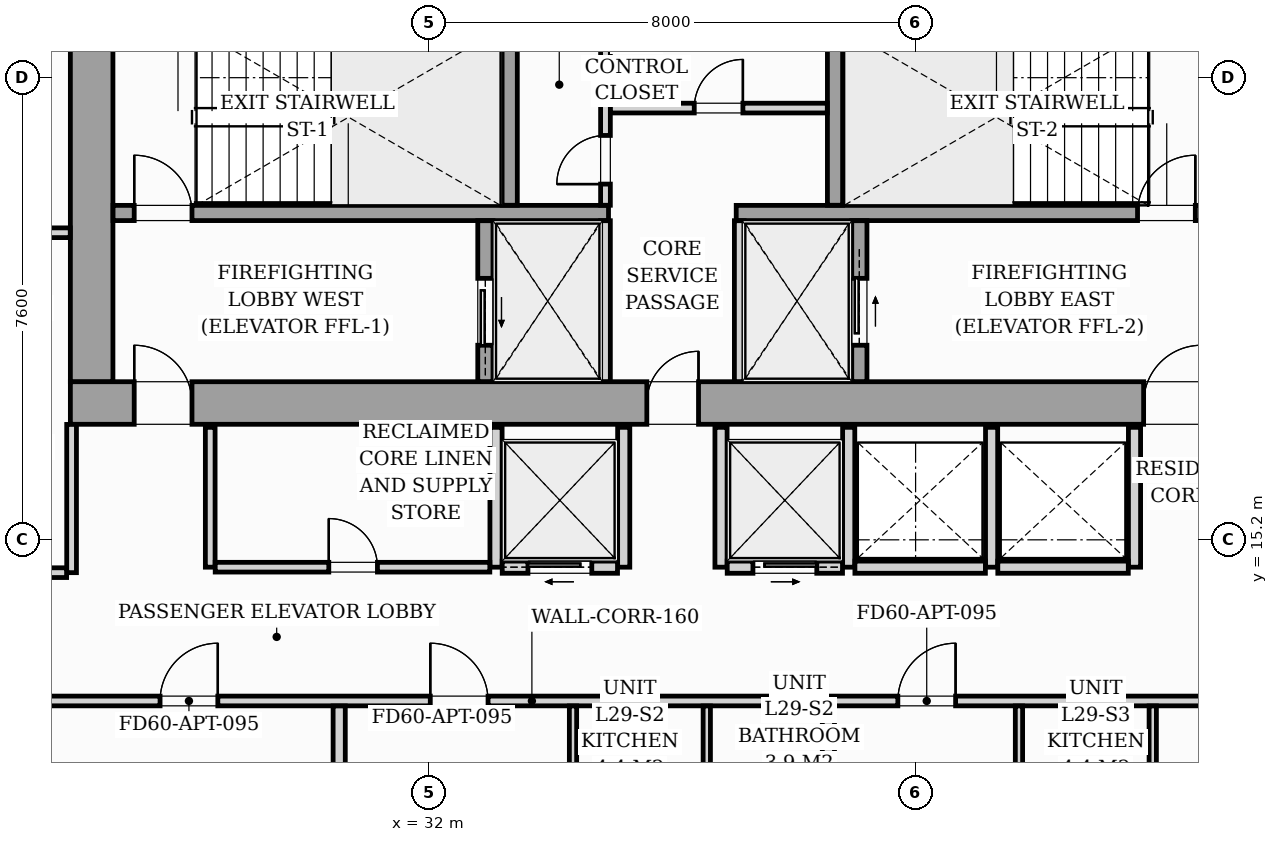
"""IFC4 building model, lengths in metres.
Left out: names, types, materials, properties, quantities, classifications, styles, units other than length and angle.
Written with IfcOpenShell. Run it as: python <this file> out.ifc"""

import sys

from ifc_helpers import new_model, si_unit, direction, frame, frame_2d, origin, origin_2d, place, context, subcontext, project, spatial, rectangle, i_section, extrude, source, transform, mapped, element, fill, save


model = new_model("IFC4")
c1 = context("Model", 3, precision=1e-05, world=origin(), true_north=direction((0.0, 1.0)))
c2 = subcontext(c1, "Body", "Model", "MODEL_VIEW")
j1 = project(units=[si_unit("LENGTHUNIT", "METRE"), si_unit("PLANEANGLEUNIT", "RADIAN")], contexts=[c1])
p1 = place(None, origin())
s1 = spatial("IfcSite", under=j1, at=p1, CompositionType="ELEMENT")
p2 = place(p1, origin())
s2 = spatial("IfcBuilding", under=s1, at=p2, CompositionType="ELEMENT")
p3 = place(p2, frame((0.0, 0.0, 103.4)))
s3 = spatial("IfcBuildingStorey", under=s2, at=p3, CompositionType="ELEMENT", Elevation=103.4)
m1 = source(origin(), c2, "Body", "SweptSolid", [
    extrude(i_section(OverallWidth=0.427, OverallDepth=0.483, WebThickness=0.051, FlangeThickness=0.082, FilletRadius=0.018, at=origin_2d()), origin(), (0.0, 0.0, 1.0), 3.196),
])
for number, where, z_axis, x_axis in (
    (1, (26.4, 17.4, 0.002), (0.0, 0.0, 1.0), (1.0, 0.0, 0.0)),
    (2, (33.12, 17.4, 0.002), (0.0, 0.0, 1.0), (1.0, 0.0, 0.0)),
    (3, (38.88, 17.4, 0.002), (0.0, 0.0, 1.0), (1.0, 0.0, 0.0)),
):
    element("IfcColumn", number, at=place(p3, frame(where, z_axis=z_axis, x_axis=x_axis)), inside=s3, PredefinedType="PILASTER", context=c2, shape_type="MappedRepresentation", body=[
        mapped(m1, transform((0.0, 0.0, 0.0), scale=1.0)),
    ])
p4 = place(p3, frame((26.1, 17.45, 0.0), z_axis=(0.0, 0.0, 1.0), x_axis=(1.0, 0.0, 0.0)))
e4 = element("IfcWall", 4, at=p4, inside=s3, PredefinedType="SHEAR", context=c2, shape_type="SweptSolid", body=[
    extrude(rectangle(XDim=19.8, YDim=0.7, at=frame_2d((9.9, 0.0))), origin(), (0.0, 0.0, 1.0), 3.2),
])
p5 = place(p4, frame((1.05, 0.0, 0.0)))
e5 = element("IfcOpeningElement", 5, at=p5, cuts=e4, PredefinedType="OPENING", context=c2, shape_type="SweptSolid", body=[
    extrude(rectangle(XDim=0.95, YDim=2.06, at=frame_2d((0.475, 1.03))), frame((0.0, 0.36, 0.0), z_axis=(0.0, -1.0, 0.0), x_axis=(1.0, 0.0, 0.0)), (0.0, 0.0, 1.0), 0.72),
])
p6 = place(p4, frame((9.48, 0.0, 0.0)))
e6 = element("IfcOpeningElement", 6, at=p6, cuts=e4, PredefinedType="OPENING", context=c2, shape_type="SweptSolid", body=[
    extrude(rectangle(XDim=0.85, YDim=2.0, at=frame_2d((0.425, 1.0))), frame((0.0, 0.36, 0.0), z_axis=(0.0, -1.0, 0.0), x_axis=(1.0, 0.0, 0.0)), (0.0, 0.0, 1.0), 0.72),
])
p7 = place(p4, frame((17.65, 0.0, 0.0)))
e7 = element("IfcOpeningElement", 7, at=p7, cuts=e4, PredefinedType="OPENING", context=c2, shape_type="SweptSolid", body=[
    extrude(rectangle(XDim=0.95, YDim=2.06, at=frame_2d((0.475, 1.03))), frame((0.0, 0.36, 0.0), z_axis=(0.0, -1.0, 0.0), x_axis=(1.0, 0.0, 0.0)), (0.0, 0.0, 1.0), 0.72),
])
p8 = place(p3, frame((26.45, 17.802, 0.0), z_axis=(0.0, 0.0, 1.0), x_axis=(0.0, 1.0, 0.0)))
e8 = element("IfcWall", 8, at=p8, inside=s3, PredefinedType="SHEAR", context=c2, shape_type="SweptSolid", body=[
    extrude(rectangle(XDim=5.796, YDim=0.7, at=frame_2d((2.898, 0.0))), origin(), (0.0, 0.0, 1.0), 3.2),
])
p9 = place(p3, frame((26.802, 20.575, 0.0), z_axis=(0.0, 0.0, 1.0), x_axis=(1.0, 0.0, 0.0)))
e9 = element("IfcWall", 9, at=p9, inside=s3, PredefinedType="SOLIDWALL", context=c2, shape_type="SweptSolid", body=[
    extrude(rectangle(XDim=8.148, YDim=0.25, at=frame_2d((4.074, 0.0))), origin(), (0.0, 0.0, 1.0), 3.2),
])
p10 = place(p9, frame((0.348, 0.0, 0.0)))
e10 = element("IfcOpeningElement", 10, at=p10, cuts=e9, PredefinedType="OPENING", context=c2, shape_type="SweptSolid", body=[
    extrude(rectangle(XDim=0.95, YDim=2.06, at=frame_2d((0.475, 1.03))), frame((0.0, 0.135, 0.0), z_axis=(0.0, -1.0, 0.0), x_axis=(1.0, 0.0, 0.0)), (0.0, 0.0, 1.0), 0.27),
])
p11 = place(p3, frame((37.05, 20.575, 0.0), z_axis=(0.0, 0.0, 1.0), x_axis=(1.0, 0.0, 0.0)))
e11 = element("IfcWall", 11, at=p11, inside=s3, PredefinedType="SOLIDWALL", context=c2, shape_type="SweptSolid", body=[
    extrude(rectangle(XDim=8.148, YDim=0.25, at=frame_2d((4.074, 0.0))), origin(), (0.0, 0.0, 1.0), 3.2),
])
p12 = place(p11, frame((6.6, 0.0, 0.0)))
e12 = element("IfcOpeningElement", 12, at=p12, cuts=e11, PredefinedType="OPENING", context=c2, shape_type="SweptSolid", body=[
    extrude(rectangle(XDim=0.95, YDim=2.06, at=frame_2d((0.475, 1.03))), frame((0.0, 0.135, 0.0), z_axis=(0.0, -1.0, 0.0), x_axis=(1.0, 0.0, 0.0)), (0.0, 0.0, 1.0), 0.27),
])
for number, where, z_axis, x_axis in (
    (13, (33.325, 20.702, 0.0), (0.0, 0.0, 1.0), (0.0, 1.0, 0.0)),
    (14, (38.675, 20.702, 0.0), (0.0, 0.0, 1.0), (0.0, 1.0, 0.0)),
):
    element("IfcWall", number, at=place(p3, frame(where, z_axis=z_axis, x_axis=x_axis)), inside=s3, PredefinedType="SOLIDWALL", context=c2, shape_type="SweptSolid", body=[
        extrude(rectangle(XDim=2.896, YDim=0.25, at=frame_2d((1.448, 0.0))), origin(), (0.0, 0.0, 1.0), 3.2),
    ])
p13 = place(p3, frame((32.925, 17.802, 0.0), z_axis=(0.0, 0.0, 1.0), x_axis=(0.0, 1.0, 0.0)))
e15 = element("IfcWall", 15, at=p13, inside=s3, PredefinedType="SOLIDWALL", context=c2, shape_type="SweptSolid", body=[
    extrude(rectangle(XDim=2.646, YDim=0.25, at=frame_2d((1.323, 0.0))), origin(), (0.0, 0.0, 1.0), 3.2),
])
p14 = place(p13, frame((0.598, 0.0, 0.0)))
e16 = element("IfcOpeningElement", 16, at=p14, cuts=e15, PredefinedType="OPENING", context=c2, shape_type="SweptSolid", body=[
    extrude(rectangle(XDim=1.1, YDim=2.08, at=frame_2d((0.55, 1.04))), frame((0.0, 0.135, 0.0), z_axis=(0.0, -1.0, 0.0), x_axis=(1.0, 0.0, 0.0)), (0.0, 0.0, 1.0), 0.27),
])
for number, where, z_axis, x_axis in (
    (17, (34.9, 17.802, 0.0), (0.0, 0.0, 1.0), (0.0, 1.0, 0.0)),
    (18, (37.1, 17.802, 0.0), (0.0, 0.0, 1.0), (0.0, 1.0, 0.0)),
):
    element("IfcWall", number, at=place(p3, frame(where, z_axis=z_axis, x_axis=x_axis)), inside=s3, PredefinedType="PARTITIONING", context=c2, shape_type="SweptSolid", body=[
        extrude(rectangle(XDim=2.646, YDim=0.16, at=frame_2d((1.323, 0.0))), origin(), (0.0, 0.0, 1.0), 2.94),
    ])
p15 = place(p3, frame((39.075, 17.802, 0.0), z_axis=(0.0, 0.0, 1.0), x_axis=(0.0, 1.0, 0.0)))
e19 = element("IfcWall", 19, at=p15, inside=s3, PredefinedType="SOLIDWALL", context=c2, shape_type="SweptSolid", body=[
    extrude(rectangle(XDim=2.646, YDim=0.25, at=frame_2d((1.323, 0.0))), origin(), (0.0, 0.0, 1.0), 3.2),
])
p16 = place(p15, frame((0.598, 0.0, 0.0)))
e20 = element("IfcOpeningElement", 20, at=p16, cuts=e19, PredefinedType="OPENING", context=c2, shape_type="SweptSolid", body=[
    extrude(rectangle(XDim=1.1, YDim=2.08, at=frame_2d((0.55, 1.04))), frame((0.0, 0.135, 0.0), z_axis=(0.0, -1.0, 0.0), x_axis=(1.0, 0.0, 0.0)), (0.0, 0.0, 1.0), 0.27),
])
p17 = place(p3, frame((34.9, 20.702, 0.0), z_axis=(0.0, 0.0, 1.0), x_axis=(0.0, 1.0, 0.0)))
e21 = element("IfcWall", 21, at=p17, inside=s3, PredefinedType="PARTITIONING", context=c2, shape_type="SweptSolid", body=[
    extrude(rectangle(XDim=2.896, YDim=0.16, at=frame_2d((1.448, 0.0))), origin(), (0.0, 0.0, 1.0), 2.94),
])
p18 = place(p17, frame((0.348, 0.0, 0.0)))
e22 = element("IfcOpeningElement", 22, at=p18, cuts=e21, PredefinedType="OPENING", context=c2, shape_type="SweptSolid", body=[
    extrude(rectangle(XDim=0.8, YDim=2.05, at=frame_2d((0.4, 1.025))), frame((0.0, 0.09, 0.0), z_axis=(0.0, -1.0, 0.0), x_axis=(1.0, 0.0, 0.0)), (0.0, 0.0, 1.0), 0.18),
])
p19 = place(p3, frame((34.982, 22.3, 0.0), z_axis=(0.0, 0.0, 1.0), x_axis=(1.0, 0.0, 0.0)))
e23 = element("IfcWall", 23, at=p19, inside=s3, PredefinedType="PARTITIONING", context=c2, shape_type="SweptSolid", body=[
    extrude(rectangle(XDim=3.566, YDim=0.16, at=frame_2d((1.783, 0.0))), origin(), (0.0, 0.0, 1.0), 2.94),
])
p20 = place(p19, frame((1.378, 0.0, 0.0)))
e24 = element("IfcOpeningElement", 24, at=p20, cuts=e23, PredefinedType="OPENING", context=c2, shape_type="SweptSolid", body=[
    extrude(rectangle(XDim=0.8, YDim=2.05, at=frame_2d((0.4, 1.025))), frame((0.0, 0.09, 0.0), z_axis=(0.0, -1.0, 0.0), x_axis=(1.0, 0.0, 0.0)), (0.0, 0.0, 1.0), 0.18),
])
p21 = place(p3, frame((28.4, 14.75, 0.0), z_axis=(0.0, 0.0, 1.0), x_axis=(0.0, 1.0, 0.0)))
e25 = element("IfcWall", 25, at=p21, inside=s3, PredefinedType="PARTITIONING", context=c2, shape_type="SweptSolid", body=[
    extrude(rectangle(XDim=2.3, YDim=0.16, at=frame_2d((1.15, 0.0))), origin(), (0.0, 0.0, 1.0), 2.94),
])
p22 = place(p3, frame((33.1, 14.75, 0.0), z_axis=(0.0, 0.0, 1.0), x_axis=(0.0, 1.0, 0.0)))
e26 = element("IfcWall", 26, at=p22, inside=s3, PredefinedType="PARTITIONING", context=c2, shape_type="SweptSolid", body=[
    extrude(rectangle(XDim=2.3, YDim=0.2, at=frame_2d((1.15, 0.0))), origin(), (0.0, 0.0, 1.0), 2.94),
])
p23 = place(p3, frame((28.482, 14.75, 0.0), z_axis=(0.0, 0.0, 1.0), x_axis=(1.0, 0.0, 0.0)))
e27 = element("IfcWall", 27, at=p23, inside=s3, PredefinedType="PARTITIONING", context=c2, shape_type="SweptSolid", body=[
    extrude(rectangle(XDim=4.516, YDim=0.16, at=frame_2d((2.258, 0.0))), origin(), (0.0, 0.0, 1.0), 2.94),
])
p24 = place(p23, frame((1.868, 0.0, 0.0)))
e28 = element("IfcOpeningElement", 28, at=p24, cuts=e27, PredefinedType="OPENING", context=c2, shape_type="SweptSolid", body=[
    extrude(rectangle(XDim=0.8, YDim=2.05, at=frame_2d((0.4, 1.025))), frame((0.0, 0.09, 0.0), z_axis=(0.0, -1.0, 0.0), x_axis=(1.0, 0.0, 0.0)), (0.0, 0.0, 1.0), 0.18),
])
p25 = place(p3, frame((35.2, 14.75, 0.0), z_axis=(0.0, 0.0, 1.0), x_axis=(0.0, 1.0, 0.0)))
e29 = element("IfcWall", 29, at=p25, inside=s3, PredefinedType="PARTITIONING", context=c2, shape_type="SweptSolid", body=[
    extrude(rectangle(XDim=2.3, YDim=0.2, at=frame_2d((1.15, 0.0))), origin(), (0.0, 0.0, 1.0), 2.94),
])
p26 = place(p3, frame((33.202, 14.75, 0.0), z_axis=(0.0, 0.0, 1.0), x_axis=(1.0, 0.0, 0.0)))
e30 = element("IfcWall", 30, at=p26, inside=s3, PredefinedType="PARTITIONING", context=c2, shape_type="SweptSolid", body=[
    extrude(rectangle(XDim=1.896, YDim=0.2, at=frame_2d((0.948, 0.0))), origin(), (0.0, 0.0, 1.0), 2.94),
])
p27 = place(p26, frame((0.423, 0.0, 0.0)))
e31 = element("IfcOpeningElement", 31, at=p27, cuts=e30, PredefinedType="OPENING", context=c2, shape_type="SweptSolid", body=[
    extrude(rectangle(XDim=1.05, YDim=2.08, at=frame_2d((0.525, 1.04))), frame((0.0, 0.11, 0.0), z_axis=(0.0, -1.0, 0.0), x_axis=(1.0, 0.0, 0.0)), (0.0, 0.0, 1.0), 0.22),
])
for number, where, z_axis, x_axis in (
    (32, (36.8, 14.75, 0.0), (0.0, 0.0, 1.0), (0.0, 1.0, 0.0)),
    (33, (38.9, 14.75, 0.0), (0.0, 0.0, 1.0), (0.0, 1.0, 0.0)),
):
    element("IfcWall", number, at=place(p3, frame(where, z_axis=z_axis, x_axis=x_axis)), inside=s3, PredefinedType="PARTITIONING", context=c2, shape_type="SweptSolid", body=[
        extrude(rectangle(XDim=2.3, YDim=0.2, at=frame_2d((1.15, 0.0))), origin(), (0.0, 0.0, 1.0), 2.94),
    ])
p28 = place(p3, frame((36.902, 14.75, 0.0), z_axis=(0.0, 0.0, 1.0), x_axis=(1.0, 0.0, 0.0)))
e34 = element("IfcWall", 34, at=p28, inside=s3, PredefinedType="PARTITIONING", context=c2, shape_type="SweptSolid", body=[
    extrude(rectangle(XDim=1.896, YDim=0.2, at=frame_2d((0.948, 0.0))), origin(), (0.0, 0.0, 1.0), 2.94),
])
p29 = place(p28, frame((0.423, 0.0, 0.0)))
e35 = element("IfcOpeningElement", 35, at=p29, cuts=e34, PredefinedType="OPENING", context=c2, shape_type="SweptSolid", body=[
    extrude(rectangle(XDim=1.05, YDim=2.08, at=frame_2d((0.525, 1.04))), frame((0.0, 0.11, 0.0), z_axis=(0.0, -1.0, 0.0), x_axis=(1.0, 0.0, 0.0)), (0.0, 0.0, 1.0), 0.22),
])
for number, where, z_axis, x_axis in (
    (36, (41.25, 14.75, 0.0), (0.0, 0.0, 1.0), (0.0, 1.0, 0.0)),
    (37, (43.6, 14.75, 0.0), (0.0, 0.0, 1.0), (0.0, 1.0, 0.0)),
):
    element("IfcWall", number, at=place(p3, frame(where, z_axis=z_axis, x_axis=x_axis)), inside=s3, PredefinedType="PARTITIONING", context=c2, shape_type="SweptSolid", body=[
        extrude(rectangle(XDim=2.3, YDim=0.2, at=frame_2d((1.15, 0.0))), origin(), (0.0, 0.0, 1.0), 2.94),
    ])
for number, where, z_axis, x_axis in (
    (38, (39.002, 14.75, 0.0), (0.0, 0.0, 1.0), (1.0, 0.0, 0.0)),
    (39, (41.352, 14.75, 0.0), (0.0, 0.0, 1.0), (1.0, 0.0, 0.0)),
):
    element("IfcWall", number, at=place(p3, frame(where, z_axis=z_axis, x_axis=x_axis)), inside=s3, PredefinedType="PARTITIONING", context=c2, shape_type="SweptSolid", body=[
        extrude(rectangle(XDim=2.146, YDim=0.2, at=frame_2d((1.073, 0.0))), origin(), (0.0, 0.0, 1.0), 2.94),
    ])
p30 = place(p3, frame((21.5, 12.55, 0.0), z_axis=(0.0, 0.0, 1.0), x_axis=(1.0, 0.0, 0.0)))
e40 = element("IfcWall", 40, at=p30, inside=s3, PredefinedType="PARTITIONING", context=c2, shape_type="SweptSolid", body=[
    extrude(rectangle(XDim=24.38, YDim=0.16, at=frame_2d((12.19, 0.0))), origin(), (0.0, 0.0, 1.0), 2.94),
])
p31 = place(p30, frame((6.075, 0.0, 0.0)))
e41 = element("IfcOpeningElement", 41, at=p31, cuts=e40, PredefinedType="OPENING", context=c2, shape_type="SweptSolid", body=[
    extrude(rectangle(XDim=0.95, YDim=2.06, at=frame_2d((0.475, 1.03))), frame((0.0, 0.09, 0.0), z_axis=(0.0, -1.0, 0.0), x_axis=(1.0, 0.0, 0.0)), (0.0, 0.0, 1.0), 0.18),
])
p32 = place(p30, frame((10.519, 0.0, 0.0)))
e42 = element("IfcOpeningElement", 42, at=p32, cuts=e40, PredefinedType="OPENING", context=c2, shape_type="SweptSolid", body=[
    extrude(rectangle(XDim=0.95, YDim=2.06, at=frame_2d((0.475, 1.03))), frame((0.0, 0.09, 0.0), z_axis=(0.0, -1.0, 0.0), x_axis=(1.0, 0.0, 0.0)), (0.0, 0.0, 1.0), 0.18),
])
p33 = place(p30, frame((18.208, 0.0, 0.0)))
e43 = element("IfcOpeningElement", 43, at=p33, cuts=e40, PredefinedType="OPENING", context=c2, shape_type="SweptSolid", body=[
    extrude(rectangle(XDim=0.95, YDim=2.06, at=frame_2d((0.475, 1.03))), frame((0.0, 0.09, 0.0), z_axis=(0.0, -1.0, 0.0), x_axis=(1.0, 0.0, 0.0)), (0.0, 0.0, 1.0), 0.18),
])
p34 = place(p3, frame((30.521, 5.681, 0.0), z_axis=(0.0, 0.0, 1.0), x_axis=(0.0, 1.0, 0.0)))
e44 = element("IfcWall", 44, at=p34, inside=s3, PredefinedType="PARTITIONING", context=c2, shape_type="SweptSolid", body=[
    extrude(rectangle(XDim=6.787, YDim=0.2, at=frame_2d((3.394, 0.0))), origin(), (0.0, 0.0, 1.0), 2.94),
])
for number, where, z_axis, x_axis in (
    (45, (34.366, 10.362, 0.0), (0.0, 0.0, 1.0), (0.0, 1.0, 0.0)),
    (46, (36.566, 10.362, 0.0), (0.0, 0.0, 1.0), (0.0, 1.0, 0.0)),
):
    element("IfcWall", number, at=place(p3, frame(where, z_axis=z_axis, x_axis=x_axis)), inside=s3, PredefinedType="PARTITIONING", context=c2, shape_type="SweptSolid", body=[
        extrude(rectangle(XDim=2.106, YDim=0.12, at=frame_2d((1.053, 0.0))), origin(), (0.0, 0.0, 1.0), 2.94),
    ])
p35 = place(p3, frame((38.566, 10.362, 0.0), z_axis=(0.0, 0.0, 1.0), x_axis=(0.0, 1.0, 0.0)))
e47 = element("IfcWall", 47, at=p35, inside=s3, PredefinedType="PARTITIONING", context=c2, shape_type="SweptSolid", body=[
    extrude(rectangle(XDim=2.106, YDim=0.2, at=frame_2d((1.053, 0.0))), origin(), (0.0, 0.0, 1.0), 2.94),
])
for number, where, z_axis, x_axis in (
    (48, (41.7, 10.362, 0.0), (0.0, 0.0, 1.0), (0.0, 1.0, 0.0)),
    (49, (43.9, 10.362, 0.0), (0.0, 0.0, 1.0), (0.0, 1.0, 0.0)),
):
    element("IfcWall", number, at=place(p3, frame(where, z_axis=z_axis, x_axis=x_axis)), inside=s3, PredefinedType="PARTITIONING", context=c2, shape_type="SweptSolid", body=[
        extrude(rectangle(XDim=2.106, YDim=0.12, at=frame_2d((1.053, 0.0))), origin(), (0.0, 0.0, 1.0), 2.94),
    ])
p36 = place(p3, frame((23.632, 20.25, 0.0), z_axis=(0.0, 0.0, 1.0), x_axis=(1.0, 0.0, 0.0)))
e50 = element("IfcWall", 50, at=p36, inside=s3, PredefinedType="PARTITIONING", context=c2, shape_type="SweptSolid", body=[
    extrude(rectangle(XDim=2.466, YDim=0.16, at=frame_2d((1.233, 0.0))), origin(), (0.0, 0.0, 1.0), 2.94),
])
p37 = place(p3, frame((26.12, 14.66, 0.0), z_axis=(0.0, 0.0, 1.0), x_axis=(0.0, 1.0, 0.0)))
e51 = element("IfcWall", 51, at=p37, inside=s3, PredefinedType="PARTITIONING", context=c2, shape_type="SweptSolid", body=[
    extrude(rectangle(XDim=2.438, YDim=0.16, at=frame_2d((1.219, 0.0))), origin(), (0.0, 0.0, 1.0), 2.94),
])
p38 = place(p3, frame((23.632, 14.66, 0.0), z_axis=(0.0, 0.0, 1.0), x_axis=(1.0, 0.0, 0.0)))
e52 = element("IfcWall", 52, at=p38, inside=s3, PredefinedType="PARTITIONING", context=c2, shape_type="SweptSolid", body=[
    extrude(rectangle(XDim=2.406, YDim=0.16, at=frame_2d((1.203, 0.0))), origin(), (0.0, 0.0, 1.0), 2.94),
])
m2 = source(origin(), c2, "Body", "SweptSolid", [
    extrude(rectangle(XDim=0.95, YDim=2.06, at=frame_2d((0.475, 1.03))), frame((0.0, 0.025, 0.0), z_axis=(0.0, -1.0, 0.0), x_axis=(1.0, 0.0, 0.0)), (0.0, 0.0, 1.0), 0.05),
])
p39 = place(p5, origin())
e53 = element("IfcDoor", 53, at=p39, inside=s3, OperationType="SINGLE_SWING_LEFT", PredefinedType="DOOR", context=c2, shape_type="MappedRepresentation", body=[
    mapped(m2, transform((0.0, 0.0, 0.0), scale=1.0)),
])
fill(e5, e53)
m3 = source(origin(), c2, "Body", "SweptSolid", [
    extrude(rectangle(XDim=0.85, YDim=2.0, at=frame_2d((0.425, 1.0))), frame((0.0, 0.025, 0.0), z_axis=(0.0, -1.0, 0.0), x_axis=(1.0, 0.0, 0.0)), (0.0, 0.0, 1.0), 0.05),
])
p40 = place(p6, origin())
e54 = element("IfcDoor", 54, at=p40, inside=s3, OperationType="SINGLE_SWING_RIGHT", PredefinedType="DOOR", context=c2, shape_type="MappedRepresentation", body=[
    mapped(m3, transform((0.0, 0.0, 0.0), scale=1.0)),
])
fill(e6, e54)
p41 = place(p7, origin())
e55 = element("IfcDoor", 55, at=p41, inside=s3, OperationType="SINGLE_SWING_RIGHT", PredefinedType="DOOR", context=c2, shape_type="MappedRepresentation", body=[
    mapped(m2, transform((0.0, 0.0, 0.0), scale=1.0)),
])
fill(e7, e55)
p42 = place(p10, origin())
e56 = element("IfcDoor", 56, at=p42, inside=s3, OperationType="SINGLE_SWING_LEFT", PredefinedType="DOOR", context=c2, shape_type="MappedRepresentation", body=[
    mapped(m2, transform((0.0, 0.0, 0.0), scale=1.0)),
])
fill(e10, e56)
p43 = place(p12, origin())
e57 = element("IfcDoor", 57, at=p43, inside=s3, OperationType="SINGLE_SWING_RIGHT", PredefinedType="DOOR", context=c2, shape_type="MappedRepresentation", body=[
    mapped(m2, transform((0.0, 0.0, 0.0), scale=1.0)),
])
fill(e12, e57)
m4 = source(origin(), c2, "Body", "SweptSolid", [
    extrude(rectangle(XDim=1.1, YDim=2.08, at=frame_2d((0.55, 1.04))), frame((0.0, 0.025, 0.0), z_axis=(0.0, -1.0, 0.0), x_axis=(1.0, 0.0, 0.0)), (0.0, 0.0, 1.0), 0.05),
])
p44 = place(p14, origin())
e58 = element("IfcDoor", 58, at=p44, inside=s3, OperationType="SLIDING_TO_LEFT", PredefinedType="DOOR", context=c2, shape_type="MappedRepresentation", body=[
    mapped(m4, transform((0.0, 0.0, 0.0), scale=1.0)),
])
fill(e16, e58)
p45 = place(p16, origin())
e59 = element("IfcDoor", 59, at=p45, inside=s3, OperationType="SLIDING_TO_RIGHT", PredefinedType="DOOR", context=c2, shape_type="MappedRepresentation", body=[
    mapped(m4, transform((0.0, 0.0, 0.0), scale=1.0)),
])
fill(e20, e59)
m5 = source(origin(), c2, "Body", "SweptSolid", [
    extrude(rectangle(XDim=0.8, YDim=2.05, at=frame_2d((0.4, 1.025))), frame((0.0, 0.025, 0.0), z_axis=(0.0, -1.0, 0.0), x_axis=(1.0, 0.0, 0.0)), (0.0, 0.0, 1.0), 0.05),
])
p46 = place(p18, origin())
e60 = element("IfcDoor", 60, at=p46, inside=s3, OperationType="SINGLE_SWING_LEFT", PredefinedType="DOOR", context=c2, shape_type="MappedRepresentation", body=[
    mapped(m5, transform((0.0, 0.0, 0.0), scale=1.0)),
])
fill(e22, e60)
p47 = place(p20, origin())
e61 = element("IfcDoor", 61, at=p47, inside=s3, OperationType="SINGLE_SWING_RIGHT", PredefinedType="DOOR", context=c2, shape_type="MappedRepresentation", body=[
    mapped(m5, transform((0.0, 0.0, 0.0), scale=1.0)),
])
fill(e24, e61)
p48 = place(p24, origin())
e62 = element("IfcDoor", 62, at=p48, inside=s3, OperationType="SINGLE_SWING_LEFT", PredefinedType="DOOR", context=c2, shape_type="MappedRepresentation", body=[
    mapped(m5, transform((0.0, 0.0, 0.0), scale=1.0)),
])
fill(e28, e62)
m6 = source(origin(), c2, "Body", "SweptSolid", [
    extrude(rectangle(XDim=1.05, YDim=2.08, at=frame_2d((0.525, 1.04))), frame((0.0, 0.025, 0.0), z_axis=(0.0, -1.0, 0.0), x_axis=(1.0, 0.0, 0.0)), (0.0, 0.0, 1.0), 0.05),
])
p49 = place(p27, origin())
e63 = element("IfcDoor", 63, at=p49, inside=s3, OperationType="SLIDING_TO_LEFT", PredefinedType="DOOR", context=c2, shape_type="MappedRepresentation", body=[
    mapped(m6, transform((0.0, 0.0, 0.0), scale=1.0)),
])
fill(e31, e63)
p50 = place(p29, origin())
e64 = element("IfcDoor", 64, at=p50, inside=s3, OperationType="SLIDING_TO_RIGHT", PredefinedType="DOOR", context=c2, shape_type="MappedRepresentation", body=[
    mapped(m6, transform((0.0, 0.0, 0.0), scale=1.0)),
])
fill(e35, e64)
m7 = source(origin(), c2, "Body", "SweptSolid", [
    extrude(rectangle(XDim=0.95, YDim=2.06, at=frame_2d((0.475, 1.03))), frame((0.0, 0.025, 0.0), z_axis=(0.0, -1.0, 0.0), x_axis=(1.0, 0.0, 0.0)), (0.0, 0.0, 1.0), 0.05),
])
p51 = place(p31, origin())
e65 = element("IfcDoor", 65, at=p51, inside=s3, OperationType="SINGLE_SWING_RIGHT", PredefinedType="DOOR", context=c2, shape_type="MappedRepresentation", body=[
    mapped(m7, transform((0.0, 0.0, 0.0), scale=1.0)),
])
fill(e41, e65)
p52 = place(p32, origin())
e66 = element("IfcDoor", 66, at=p52, inside=s3, OperationType="SINGLE_SWING_LEFT", PredefinedType="DOOR", context=c2, shape_type="MappedRepresentation", body=[
    mapped(m7, transform((0.0, 0.0, 0.0), scale=1.0)),
])
fill(e42, e66)
p53 = place(p33, origin())
e67 = element("IfcDoor", 67, at=p53, inside=s3, OperationType="SINGLE_SWING_RIGHT", PredefinedType="DOOR", context=c2, shape_type="MappedRepresentation", body=[
    mapped(m7, transform((0.0, 0.0, 0.0), scale=1.0)),
])
fill(e43, e67)
save(model, sys.argv[1])
